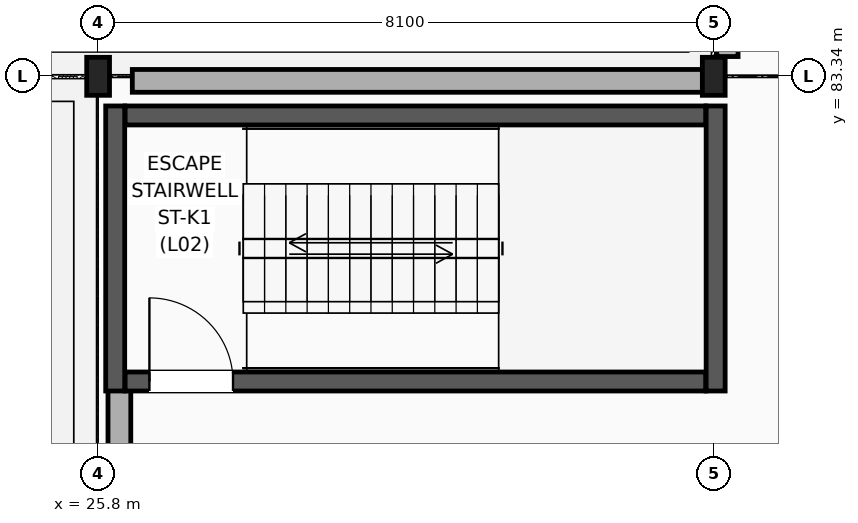
"""IFC4 building model, lengths in metres.
Left out: names, types, materials, properties, quantities, classifications, styles, units other than length and angle.
Written with IfcOpenShell. Run it as: python <this file> out.ifc"""

import sys

from ifc_helpers import new_model, si_unit, direction, frame, frame_2d, origin, origin_2d, place, context, subcontext, project, spatial, rectangle, i_section, extrude, element, fill, save


model = new_model("IFC4")
c1 = context("Model", 3, precision=1e-05, world=origin(), true_north=direction((0.0, 1.0)))
c2 = subcontext(c1, "Body", "Model", "MODEL_VIEW")
j1 = project(units=[si_unit("LENGTHUNIT", "METRE"), si_unit("PLANEANGLEUNIT", "RADIAN")], contexts=[c1])
p1 = place(None, origin())
s1 = spatial("IfcSite", under=j1, at=p1, CompositionType="ELEMENT")
p2 = place(p1, origin())
s2 = spatial("IfcBuilding", under=s1, at=p2, CompositionType="ELEMENT")
p3 = place(p2, frame((0.0, 0.0, 10.2)))
s3 = spatial("IfcBuildingStorey", under=s2, at=p3, CompositionType="ELEMENT", Elevation=10.2)
for number, where, z_axis, x_axis in (
    (1, (25.8, 83.34, 0.0), (0.0, 0.0, 1.0), (1.0, 0.0, 0.0)),
    (2, (33.9, 83.34, 0.0), (0.0, 0.0, 1.0), (1.0, 0.0, 0.0)),
):
    element("IfcColumn", number, at=place(p3, frame(where, z_axis=z_axis, x_axis=x_axis)), inside=s3, PredefinedType="COLUMN", context=c2, shape_type="SweptSolid", body=[
        extrude(i_section(OverallWidth=0.3, OverallDepth=0.5, WebThickness=0.014, FlangeThickness=0.028, FilletRadius=0.027, at=origin_2d()), origin(), (0.0, 0.0, 1.0), 4.5),
    ])
p4 = place(p3, frame((26.08, 61.35, 0.0), z_axis=(0.0, 0.0, 1.0), x_axis=(0.0, 1.0, 0.0)))
e3 = element("IfcWall", 3, at=p4, inside=s3, PredefinedType="SOLIDWALL", context=c2, shape_type="SweptSolid", body=[
    extrude(rectangle(XDim=17.95, YDim=0.3, at=frame_2d((8.975, 0.0))), origin(), (0.0, 0.0, 1.0), 3.605),
])
p5 = place(p3, frame((26.25, 83.28, 0.0), z_axis=(0.0, 0.0, 1.0), x_axis=(1.0, 0.0, 0.0)))
e4 = element("IfcWall", 4, at=p5, inside=s3, PredefinedType="SOLIDWALL", context=c2, shape_type="SweptSolid", body=[
    extrude(rectangle(XDim=7.55, YDim=0.3, at=frame_2d((3.775, 0.0))), origin(), (0.0, 0.0, 1.0), 3.605),
])
p6 = place(p3, frame((34.08, 83.6, 0.0), z_axis=(0.0, 0.0, 1.0), x_axis=(0.0, 1.0, 0.0)))
e5 = element("IfcWall", 5, at=p6, inside=s3, PredefinedType="SOLIDWALL", context=c2, shape_type="SweptSolid", body=[
    extrude(rectangle(XDim=10.6, YDim=0.28, at=frame_2d((5.3, 0.0))), origin(), (0.0, 0.0, 1.0), 4.205),
])
p7 = place(p3, frame((26.155, 79.325, 0.0), z_axis=(0.0, 0.0, 1.0), x_axis=(1.0, 0.0, 0.0)))
e6 = element("IfcWall", 6, at=p7, inside=s3, PredefinedType="SHEAR", context=c2, shape_type="SweptSolid", body=[
    extrude(rectangle(XDim=7.64, YDim=0.25, at=frame_2d((3.82, 0.0))), origin(), (0.0, 0.0, 1.0), 4.225),
])
p8 = place(p7, frame((0.32, 0.0, 0.0)))
e7 = element("IfcOpeningElement", 7, at=p8, cuts=e6, PredefinedType="OPENING", context=c2, shape_type="SweptSolid", body=[
    extrude(rectangle(XDim=1.1, YDim=2.2, at=frame_2d((0.55, 1.1))), frame((0.0, 0.135, 0.0), z_axis=(0.0, -1.0, 0.0), x_axis=(1.0, 0.0, 0.0)), (0.0, 0.0, 1.0), 0.27),
])
p9 = place(p3, frame((26.155, 82.825, 0.0), z_axis=(0.0, 0.0, 1.0), x_axis=(1.0, 0.0, 0.0)))
e8 = element("IfcWall", 8, at=p9, inside=s3, PredefinedType="SHEAR", context=c2, shape_type="SweptSolid", body=[
    extrude(rectangle(XDim=7.64, YDim=0.25, at=frame_2d((3.82, 0.0))), origin(), (0.0, 0.0, 1.0), 4.225),
])
for number, where, z_axis, x_axis in (
    (9, (26.025, 79.2, 0.0), (0.0, 0.0, 1.0), (0.0, 1.0, 0.0)),
    (10, (33.925, 79.2, 0.0), (0.0, 0.0, 1.0), (0.0, 1.0, 0.0)),
):
    element("IfcWall", number, at=place(p3, frame(where, z_axis=z_axis, x_axis=x_axis)), inside=s3, PredefinedType="SHEAR", context=c2, shape_type="SweptSolid", body=[
        extrude(rectangle(XDim=3.75, YDim=0.25, at=frame_2d((1.875, 0.0))), origin(), (0.0, 0.0, 1.0), 4.225),
    ])
p10 = place(p8, origin())
e11 = element("IfcDoor", 11, at=p10, inside=s3, OperationType="SINGLE_SWING_LEFT", PredefinedType="DOOR", context=c2, shape_type="SweptSolid", body=[
    extrude(rectangle(XDim=1.1, YDim=2.2, at=frame_2d((0.55, 1.1))), frame((0.0, 0.025, 0.0), z_axis=(0.0, -1.0, 0.0), x_axis=(1.0, 0.0, 0.0)), (0.0, 0.0, 1.0), 0.05),
])
fill(e7, e11)
save(model, sys.argv[1])
